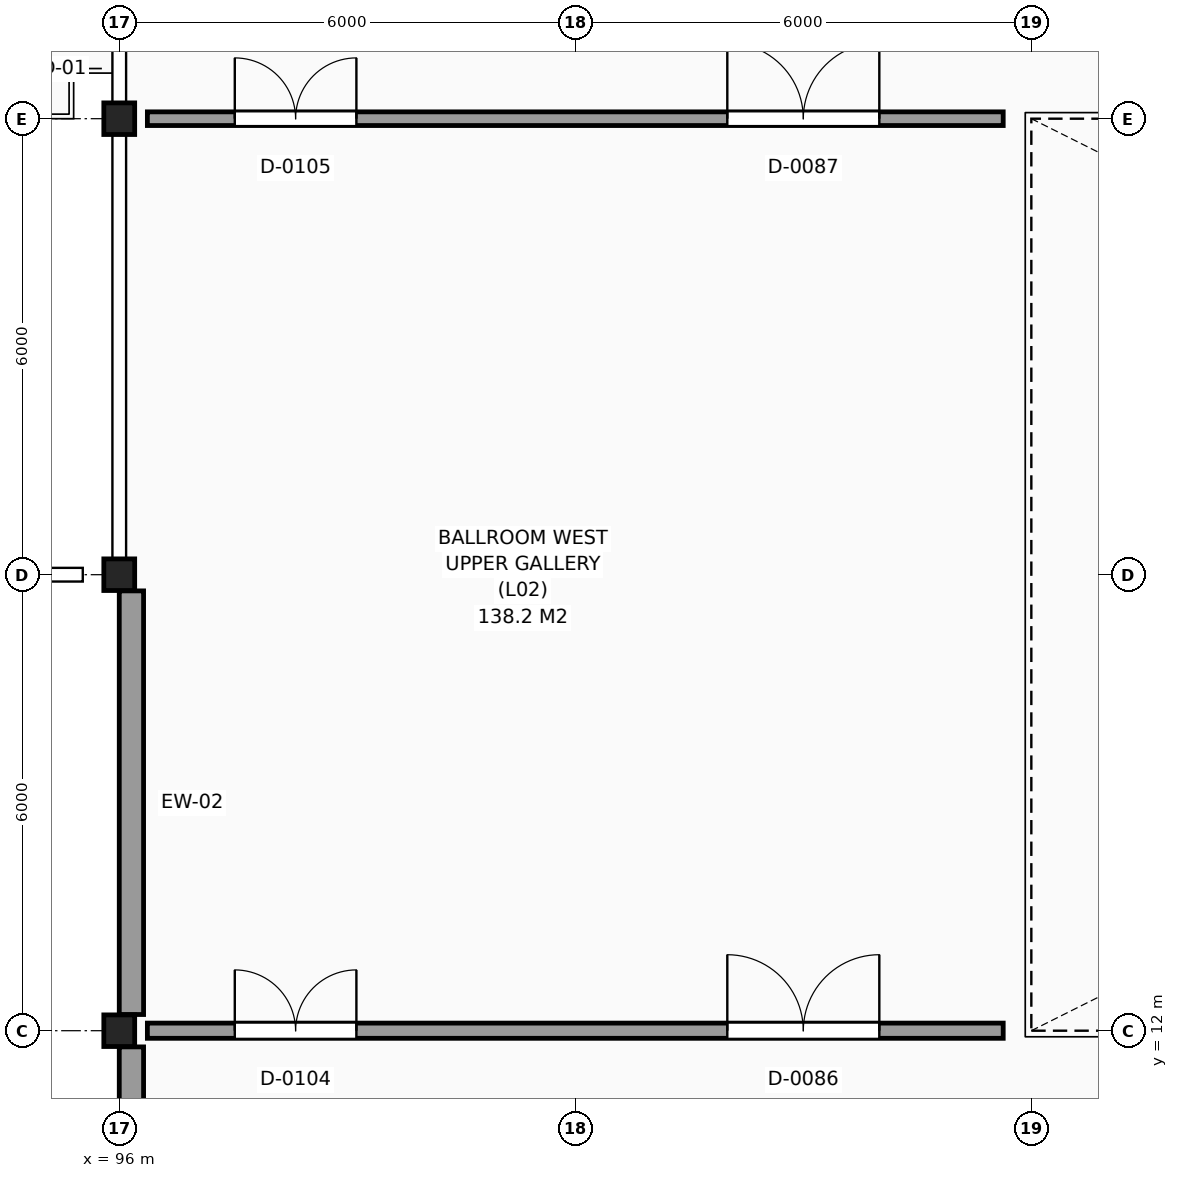
"""IFC4 building model, lengths in metres.
Left out: names, types, materials, properties, quantities, classifications, styles, units other than length and angle.
Written with IfcOpenShell. Run it as: python <this file> out.ifc"""

import sys

from ifc_helpers import new_model, si_unit, direction, frame, frame_2d, origin, origin_2d, place, context, subcontext, project, spatial, rectangle, i_section, extrude, element, fill, save


model = new_model("IFC4")
c1 = context("Model", 3, precision=1e-05, world=origin(), true_north=direction((0.0, 1.0)))
c2 = subcontext(c1, "Body", "Model", "MODEL_VIEW")
j1 = project(units=[si_unit("LENGTHUNIT", "METRE"), si_unit("PLANEANGLEUNIT", "RADIAN")], contexts=[c1])
p1 = place(None, origin())
s1 = spatial("IfcSite", under=j1, at=p1, CompositionType="ELEMENT")
p2 = place(p1, origin())
s2 = spatial("IfcBuilding", under=s1, at=p2, CompositionType="ELEMENT")
p3 = place(p2, frame((0.0, 0.0, 10.5)))
s3 = spatial("IfcBuildingStorey", under=s2, at=p3, CompositionType="ELEMENT", Elevation=10.5)
for number, where, z_axis, x_axis in (
    (1, (96.0, 12.0, 0.0), (0.0, 0.0, 1.0), (1.0, 0.0, 0.0)),
    (2, (96.0, 18.0, 0.0), (0.0, 0.0, 1.0), (1.0, 0.0, 0.0)),
    (3, (96.0, 24.0, 0.0), (0.0, 0.0, 1.0), (1.0, 0.0, 0.0)),
):
    element("IfcColumn", number, at=place(p3, frame(where, z_axis=z_axis, x_axis=x_axis)), inside=s3, PredefinedType="COLUMN", context=c2, shape_type="SweptSolid", body=[
        extrude(i_section(OverallWidth=0.406, OverallDepth=0.416, WebThickness=0.021, FlangeThickness=0.035, FilletRadius=0.015, at=origin_2d()), origin(), (0.0, 0.0, 1.0), 4.5),
    ])
for number, where, z_axis, x_axis in (
    (4, (96.16, 17.787, 0.0), (0.0, 0.0, 1.0), (0.0, -1.0, 0.0)),
    (5, (96.16, 11.787, 0.0), (0.0, 0.0, 1.0), (0.0, -1.0, 0.0)),
):
    element("IfcWall", number, at=place(p3, frame(where, z_axis=z_axis, x_axis=x_axis)), inside=s3, PredefinedType="SOLIDWALL", context=c2, shape_type="SweptSolid", body=[
        extrude(rectangle(XDim=5.574, YDim=0.32, at=frame_2d((2.787, 0.0))), origin(), (0.0, 0.0, 1.0), 3.49),
    ])
p4 = place(p3, frame((96.37, 12.0, 0.0), z_axis=(0.0, 0.0, 1.0), x_axis=(1.0, 0.0, 0.0)))
e6 = element("IfcWall", 6, at=p4, inside=s3, PredefinedType="PARTITIONING", context=c2, shape_type="SweptSolid", body=[
    extrude(rectangle(XDim=11.26, YDim=0.2, at=frame_2d((5.63, 0.0))), origin(), (0.0, 0.0, 1.0), 4.24),
])
p5 = place(p4, frame((7.63, 0.0, 0.0)))
e7 = element("IfcOpeningElement", 7, at=p5, cuts=e6, PredefinedType="OPENING", context=c2, shape_type="SweptSolid", body=[
    extrude(rectangle(XDim=2.0, YDim=2.45, at=frame_2d((1.0, 1.225))), frame((0.0, 0.11, 0.0), z_axis=(0.0, -1.0, 0.0), x_axis=(1.0, 0.0, 0.0)), (0.0, 0.0, 1.0), 0.22),
])
p6 = place(p4, frame((1.15, 0.0, 0.0)))
e8 = element("IfcOpeningElement", 8, at=p6, cuts=e6, PredefinedType="OPENING", context=c2, shape_type="SweptSolid", body=[
    extrude(rectangle(XDim=1.6, YDim=2.25, at=frame_2d((0.8, 1.125))), frame((0.0, 0.11, 0.0), z_axis=(0.0, -1.0, 0.0), x_axis=(1.0, 0.0, 0.0)), (0.0, 0.0, 1.0), 0.22),
])
p7 = place(p3, frame((96.37, 24.0, 0.0), z_axis=(0.0, 0.0, 1.0), x_axis=(1.0, 0.0, 0.0)))
e9 = element("IfcWall", 9, at=p7, inside=s3, PredefinedType="PARTITIONING", context=c2, shape_type="SweptSolid", body=[
    extrude(rectangle(XDim=11.26, YDim=0.18, at=frame_2d((5.63, 0.0))), origin(), (0.0, 0.0, 1.0), 4.24),
])
p8 = place(p7, frame((7.63, 0.0, 0.0)))
e10 = element("IfcOpeningElement", 10, at=p8, cuts=e9, PredefinedType="OPENING", context=c2, shape_type="SweptSolid", body=[
    extrude(rectangle(XDim=2.0, YDim=2.45, at=frame_2d((1.0, 1.225))), frame((0.0, 0.1, 0.0), z_axis=(0.0, -1.0, 0.0), x_axis=(1.0, 0.0, 0.0)), (0.0, 0.0, 1.0), 0.2),
])
p9 = place(p7, frame((1.15, 0.0, 0.0)))
e11 = element("IfcOpeningElement", 11, at=p9, cuts=e9, PredefinedType="OPENING", context=c2, shape_type="SweptSolid", body=[
    extrude(rectangle(XDim=1.6, YDim=2.25, at=frame_2d((0.8, 1.125))), frame((0.0, 0.1, 0.0), z_axis=(0.0, -1.0, 0.0), x_axis=(1.0, 0.0, 0.0)), (0.0, 0.0, 1.0), 0.2),
])
p10 = place(p5, origin())
e12 = element("IfcDoor", 12, at=p10, inside=s3, OperationType="DOUBLE_DOOR_SINGLE_SWING", PredefinedType="DOOR", context=c2, shape_type="SweptSolid", body=[
    extrude(rectangle(XDim=2.0, YDim=2.45, at=frame_2d((1.0, 1.225))), frame((0.0, 0.025, 0.0), z_axis=(0.0, -1.0, 0.0), x_axis=(1.0, 0.0, 0.0)), (0.0, 0.0, 1.0), 0.05),
])
fill(e7, e12)
p11 = place(p8, origin())
e13 = element("IfcDoor", 13, at=p11, inside=s3, OperationType="DOUBLE_DOOR_SINGLE_SWING", PredefinedType="DOOR", context=c2, shape_type="SweptSolid", body=[
    extrude(rectangle(XDim=2.0, YDim=2.45, at=frame_2d((1.0, 1.225))), frame((0.0, 0.025, 0.0), z_axis=(0.0, -1.0, 0.0), x_axis=(1.0, 0.0, 0.0)), (0.0, 0.0, 1.0), 0.05),
])
fill(e10, e13)
p12 = place(p6, origin())
e14 = element("IfcDoor", 14, at=p12, inside=s3, OperationType="DOUBLE_DOOR_SINGLE_SWING", PredefinedType="DOOR", context=c2, shape_type="SweptSolid", body=[
    extrude(rectangle(XDim=1.6, YDim=2.25, at=frame_2d((0.8, 1.125))), frame((0.0, 0.025, 0.0), z_axis=(0.0, -1.0, 0.0), x_axis=(1.0, 0.0, 0.0)), (0.0, 0.0, 1.0), 0.05),
])
fill(e8, e14)
p13 = place(p9, origin())
e15 = element("IfcDoor", 15, at=p13, inside=s3, OperationType="DOUBLE_DOOR_SINGLE_SWING", PredefinedType="DOOR", context=c2, shape_type="SweptSolid", body=[
    extrude(rectangle(XDim=1.6, YDim=2.25, at=frame_2d((0.8, 1.125))), frame((0.0, 0.025, 0.0), z_axis=(0.0, -1.0, 0.0), x_axis=(1.0, 0.0, 0.0)), (0.0, 0.0, 1.0), 0.05),
])
fill(e11, e15)
save(model, sys.argv[1])
